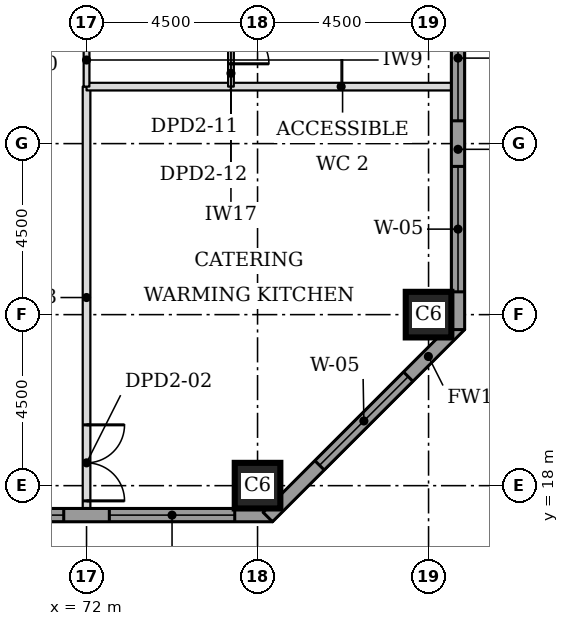
"""IFC4 building model, lengths in metres.
Left out: names, types, materials, properties, quantities, classifications, styles, units other than length and angle.
Written with IfcOpenShell. Run it as: python <this file> out.ifc"""

import sys

from ifc_helpers import new_model, si_unit, direction, frame, frame_2d, origin, origin_2d, place, context, subcontext, project, spatial, rectangle, extrude, element, fill, save


model = new_model("IFC4")
c1 = context("Model", 3, precision=1e-05, world=origin(), true_north=direction((0.0, 1.0)))
c2 = subcontext(c1, "Body", "Model", "MODEL_VIEW")
j1 = project(units=[si_unit("LENGTHUNIT", "METRE"), si_unit("PLANEANGLEUNIT", "RADIAN")], contexts=[c1])
p1 = place(None, origin())
s1 = spatial("IfcSite", under=j1, at=p1, CompositionType="ELEMENT")
p2 = place(p1, origin())
s2 = spatial("IfcBuilding", under=s1, at=p2, CompositionType="ELEMENT")
p3 = place(p2, frame((0.0, 0.0, 13.5)))
s3 = spatial("IfcBuildingStorey", under=s2, at=p3, CompositionType="ELEMENT", Elevation=13.5)
for number, where, z_axis, x_axis in (
    (1, (76.5, 18.0, 0.0), (0.0, 0.0, 1.0), (1.0, 0.0, 0.0)),
    (2, (81.0, 22.5, 0.0), (0.0, 0.0, 1.0), (1.0, 0.0, 0.0)),
):
    element("IfcColumn", number, at=place(p3, frame(where, z_axis=z_axis, x_axis=x_axis)), inside=s3, PredefinedType="COLUMN", context=c2, shape_type="SweptSolid", body=[
        extrude(rectangle(XDim=1.2, YDim=1.2, at=origin_2d()), origin(), (0.0, 0.0, 1.0), 5.0),
    ])
p4 = place(p3, frame((58.5, 17.225, 0.0), z_axis=(0.0, 0.0, 1.0), x_axis=(1.0, 0.0, 0.0)))
e3 = element("IfcWall", 3, at=p4, inside=s3, PredefinedType="STANDARD", context=c2, shape_type="SweptSolid", body=[
    extrude(rectangle(XDim=18.394, YDim=0.35, at=frame_2d((9.197, 0.0))), origin(), (0.0, 0.0, 1.0), 4.675),
])
p5 = place(p4, frame((0.6, 0.0, 0.9)))
e4 = element("IfcOpeningElement", 4, at=p5, cuts=e3, PredefinedType="OPENING", context=c2, shape_type="SweptSolid", body=[
    extrude(rectangle(XDim=3.3, YDim=3.1, at=frame_2d((1.65, 1.55))), frame((0.0, 0.185, 0.0), z_axis=(0.0, -1.0, 0.0), x_axis=(1.0, 0.0, 0.0)), (0.0, 0.0, 1.0), 0.37),
])
p6 = place(p4, frame((5.1, 0.0, 0.9)))
e5 = element("IfcOpeningElement", 5, at=p6, cuts=e3, PredefinedType="OPENING", context=c2, shape_type="SweptSolid", body=[
    extrude(rectangle(XDim=3.3, YDim=3.1, at=frame_2d((1.65, 1.55))), frame((0.0, 0.185, 0.0), z_axis=(0.0, -1.0, 0.0), x_axis=(1.0, 0.0, 0.0)), (0.0, 0.0, 1.0), 0.37),
])
p7 = place(p4, frame((9.6, 0.0, 0.9)))
e6 = element("IfcOpeningElement", 6, at=p7, cuts=e3, PredefinedType="OPENING", context=c2, shape_type="SweptSolid", body=[
    extrude(rectangle(XDim=3.3, YDim=3.1, at=frame_2d((1.65, 1.55))), frame((0.0, 0.185, 0.0), z_axis=(0.0, -1.0, 0.0), x_axis=(1.0, 0.0, 0.0)), (0.0, 0.0, 1.0), 0.37),
])
p8 = place(p4, frame((14.1, 0.0, 0.9)))
e7 = element("IfcOpeningElement", 7, at=p8, cuts=e3, PredefinedType="OPENING", context=c2, shape_type="SweptSolid", body=[
    extrude(rectangle(XDim=3.3, YDim=3.1, at=frame_2d((1.65, 1.55))), frame((0.0, 0.185, 0.0), z_axis=(0.0, -1.0, 0.0), x_axis=(1.0, 0.0, 0.0)), (0.0, 0.0, 1.0), 0.37),
])
p9 = place(p3, frame((76.77, 17.174, 0.0), z_axis=(0.0, 0.0, 1.0), x_axis=(0.707106781187, 0.707106781187, 0.0)))
e8 = element("IfcWall", 8, at=p9, inside=s3, PredefinedType="STANDARD", context=c2, shape_type="SweptSolid", body=[
    extrude(rectangle(XDim=7.151, YDim=0.35, at=frame_2d((3.576, 0.0))), origin(), (0.0, 0.0, 1.0), 4.675),
])
p10 = place(p9, frame((1.926, 0.0, 0.9)))
e9 = element("IfcOpeningElement", 9, at=p10, cuts=e8, PredefinedType="OPENING", context=c2, shape_type="SweptSolid", body=[
    extrude(rectangle(XDim=3.3, YDim=3.1, at=frame_2d((1.65, 1.55))), frame((0.0, 0.185, 0.0), z_axis=(0.0, -1.0, 0.0), x_axis=(1.0, 0.0, 0.0)), (0.0, 0.0, 1.0), 0.37),
])
p11 = place(p3, frame((81.775, 22.106, 0.0), z_axis=(0.0, 0.0, 1.0), x_axis=(0.0, 1.0, 0.0)))
e10 = element("IfcWall", 10, at=p11, inside=s3, PredefinedType="STANDARD", context=c2, shape_type="SweptSolid", body=[
    extrude(rectangle(XDim=14.287, YDim=0.35, at=frame_2d((7.144, 0.0))), origin(), (0.0, 0.0, 1.0), 4.675),
])
p12 = place(p11, frame((0.993, 0.0, 0.9)))
e11 = element("IfcOpeningElement", 11, at=p12, cuts=e10, PredefinedType="OPENING", context=c2, shape_type="SweptSolid", body=[
    extrude(rectangle(XDim=3.3, YDim=3.1, at=frame_2d((1.65, 1.55))), frame((0.0, 0.185, 0.0), z_axis=(0.0, -1.0, 0.0), x_axis=(1.0, 0.0, 0.0)), (0.0, 0.0, 1.0), 0.37),
])
p13 = place(p11, frame((5.493, 0.0, 0.9)))
e12 = element("IfcOpeningElement", 12, at=p13, cuts=e10, PredefinedType="OPENING", context=c2, shape_type="SweptSolid", body=[
    extrude(rectangle(XDim=3.3, YDim=3.1, at=frame_2d((1.65, 1.55))), frame((0.0, 0.185, 0.0), z_axis=(0.0, -1.0, 0.0), x_axis=(1.0, 0.0, 0.0)), (0.0, 0.0, 1.0), 0.37),
])
p14 = place(p11, frame((9.993, 0.0, 0.9)))
e13 = element("IfcOpeningElement", 13, at=p14, cuts=e10, PredefinedType="OPENING", context=c2, shape_type="SweptSolid", body=[
    extrude(rectangle(XDim=3.3, YDim=3.1, at=frame_2d((1.65, 1.55))), frame((0.0, 0.185, 0.0), z_axis=(0.0, -1.0, 0.0), x_axis=(1.0, 0.0, 0.0)), (0.0, 0.0, 1.0), 0.37),
])
p15 = place(p3, frame((72.0, 17.4, 0.0), z_axis=(0.0, 0.0, 1.0), x_axis=(0.0, 1.0, 0.0)))
e14 = element("IfcWall", 14, at=p15, inside=s3, PredefinedType="PARTITIONING", context=c2, shape_type="SweptSolid", body=[
    extrude(rectangle(XDim=11.1, YDim=0.2, at=frame_2d((5.55, 0.0))), origin(), (0.0, 0.0, 1.0), 4.78),
])
p16 = place(p15, frame((0.2, 0.0, 0.0)))
e15 = element("IfcOpeningElement", 15, at=p16, cuts=e14, PredefinedType="OPENING", context=c2, shape_type="SweptSolid", body=[
    extrude(rectangle(XDim=2.0, YDim=2.1, at=frame_2d((1.0, 1.05))), frame((0.0, 0.11, 0.0), z_axis=(0.0, -1.0, 0.0), x_axis=(1.0, 0.0, 0.0)), (0.0, 0.0, 1.0), 0.22),
])
p17 = place(p3, frame((72.0, 28.5, 0.0), z_axis=(0.0, 0.0, 1.0), x_axis=(1.0, 0.0, 0.0)))
e16 = element("IfcWall", 16, at=p17, inside=s3, PredefinedType="PARTITIONING", context=c2, shape_type="SweptSolid", body=[
    extrude(rectangle(XDim=3.8, YDim=0.2, at=frame_2d((1.9, 0.0))), origin(), (0.0, 0.0, 1.0), 4.78),
])
p18 = place(p3, frame((72.0, 28.5, 0.0), z_axis=(0.0, 0.0, 1.0), x_axis=(0.0, 1.0, 0.0)))
e17 = element("IfcWall", 17, at=p18, inside=s3, PredefinedType="PARTITIONING", context=c2, shape_type="SweptSolid", body=[
    extrude(rectangle(XDim=3.0, YDim=0.15, at=frame_2d((1.5, 0.0))), origin(), (0.0, 0.0, 1.0), 4.78),
])
p19 = place(p18, frame((1.0, 0.0, 0.0)))
e18 = element("IfcOpeningElement", 18, at=p19, cuts=e17, PredefinedType="OPENING", context=c2, shape_type="SweptSolid", body=[
    extrude(rectangle(XDim=1.8, YDim=2.1, at=frame_2d((0.9, 1.05))), frame((0.0, 0.085, 0.0), z_axis=(0.0, -1.0, 0.0), x_axis=(1.0, 0.0, 0.0)), (0.0, 0.0, 1.0), 0.17),
])
p20 = place(p3, frame((75.8, 28.5, 0.0), z_axis=(0.0, 0.0, 1.0), x_axis=(1.0, 0.0, 0.0)))
e19 = element("IfcWall", 19, at=p20, inside=s3, PredefinedType="PARTITIONING", context=c2, shape_type="SweptSolid", body=[
    extrude(rectangle(XDim=5.8, YDim=0.2, at=frame_2d((2.9, 0.0))), origin(), (0.0, 0.0, 1.0), 4.78),
])
p21 = place(p3, frame((75.8, 28.5, 0.0), z_axis=(0.0, 0.0, 1.0), x_axis=(0.0, 1.0, 0.0)))
e20 = element("IfcWall", 20, at=p21, inside=s3, PredefinedType="PARTITIONING", context=c2, shape_type="SweptSolid", body=[
    extrude(rectangle(XDim=2.3, YDim=0.15, at=frame_2d((1.15, 0.0))), origin(), (0.0, 0.0, 1.0), 4.78),
])
p22 = place(p21, frame((0.6, 0.0, 0.0)))
e21 = element("IfcOpeningElement", 21, at=p22, cuts=e20, PredefinedType="OPENING", context=c2, shape_type="SweptSolid", body=[
    extrude(rectangle(XDim=1.0, YDim=2.1, at=frame_2d((0.5, 1.05))), frame((0.0, 0.085, 0.0), z_axis=(0.0, -1.0, 0.0), x_axis=(1.0, 0.0, 0.0)), (0.0, 0.0, 1.0), 0.17),
])
p23 = place(p7, origin())
e22 = element("IfcWindow", 22, at=p23, inside=s3, PartitioningType="SINGLE_PANEL", PredefinedType="WINDOW", context=c2, shape_type="SweptSolid", body=[
    extrude(rectangle(XDim=3.3, YDim=3.1, at=frame_2d((1.65, 1.55))), frame((0.0, 0.085, 0.0), z_axis=(0.0, -1.0, 0.0), x_axis=(1.0, 0.0, 0.0)), (0.0, 0.0, 1.0), 0.06),
])
fill(e6, e22)
p24 = place(p8, origin())
e23 = element("IfcWindow", 23, at=p24, inside=s3, PartitioningType="SINGLE_PANEL", PredefinedType="WINDOW", context=c2, shape_type="SweptSolid", body=[
    extrude(rectangle(XDim=3.3, YDim=3.1, at=frame_2d((1.65, 1.55))), frame((0.0, 0.085, 0.0), z_axis=(0.0, -1.0, 0.0), x_axis=(1.0, 0.0, 0.0)), (0.0, 0.0, 1.0), 0.06),
])
fill(e7, e23)
p25 = place(p10, origin())
e24 = element("IfcWindow", 24, at=p25, inside=s3, PartitioningType="SINGLE_PANEL", PredefinedType="WINDOW", context=c2, shape_type="SweptSolid", body=[
    extrude(rectangle(XDim=3.3, YDim=3.1, at=frame_2d((1.65, 1.55))), frame((0.0, 0.085, 0.0), z_axis=(0.0, -1.0, 0.0), x_axis=(1.0, 0.0, 0.0)), (0.0, 0.0, 1.0), 0.06),
])
fill(e9, e24)
p26 = place(p12, origin())
e25 = element("IfcWindow", 25, at=p26, inside=s3, PartitioningType="SINGLE_PANEL", PredefinedType="WINDOW", context=c2, shape_type="SweptSolid", body=[
    extrude(rectangle(XDim=3.3, YDim=3.1, at=frame_2d((1.65, 1.55))), frame((0.0, 0.085, 0.0), z_axis=(0.0, -1.0, 0.0), x_axis=(1.0, 0.0, 0.0)), (0.0, 0.0, 1.0), 0.06),
])
fill(e11, e25)
p27 = place(p13, origin())
e26 = element("IfcWindow", 26, at=p27, inside=s3, PartitioningType="SINGLE_PANEL", PredefinedType="WINDOW", context=c2, shape_type="SweptSolid", body=[
    extrude(rectangle(XDim=3.3, YDim=3.1, at=frame_2d((1.65, 1.55))), frame((0.0, 0.085, 0.0), z_axis=(0.0, -1.0, 0.0), x_axis=(1.0, 0.0, 0.0)), (0.0, 0.0, 1.0), 0.06),
])
fill(e12, e26)
p28 = place(p16, frame((2.0, 0.0, 0.0), z_axis=(0.0, 0.0, 1.0), x_axis=(-1.0, 0.0, 0.0)))
e27 = element("IfcDoor", 27, at=p28, inside=s3, OperationType="DOUBLE_DOOR_SINGLE_SWING", PredefinedType="DOOR", context=c2, shape_type="SweptSolid", body=[
    extrude(rectangle(XDim=2.0, YDim=2.1, at=frame_2d((1.0, 1.05))), frame((0.0, 0.025, 0.0), z_axis=(0.0, -1.0, 0.0), x_axis=(1.0, 0.0, 0.0)), (0.0, 0.0, 1.0), 0.05),
])
fill(e15, e27)
p29 = place(p22, frame((1.0, 0.0, 0.0), z_axis=(0.0, 0.0, 1.0), x_axis=(-1.0, 0.0, 0.0)))
e28 = element("IfcDoor", 28, at=p29, inside=s3, OperationType="SINGLE_SWING_RIGHT", PredefinedType="DOOR", context=c2, shape_type="SweptSolid", body=[
    extrude(rectangle(XDim=1.0, YDim=2.1, at=frame_2d((0.5, 1.05))), frame((0.0, 0.025, 0.0), z_axis=(0.0, -1.0, 0.0), x_axis=(1.0, 0.0, 0.0)), (0.0, 0.0, 1.0), 0.05),
])
fill(e21, e28)
save(model, sys.argv[1])
